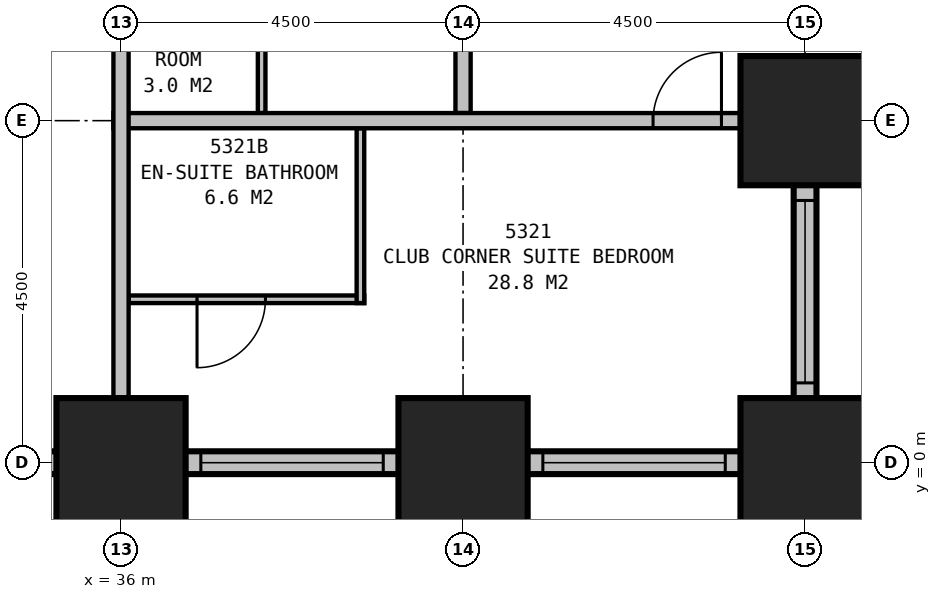
"""IFC4 building model, lengths in metres.
Left out: names, types, materials, properties, quantities, classifications, styles, units other than length and angle.
Written with IfcOpenShell. Run it as: python <this file> out.ifc"""

import sys

from ifc_helpers import new_model, si_unit, direction, frame, frame_2d, origin, origin_2d, place, context, subcontext, project, spatial, rectangle, extrude, element, fill, save


model = new_model("IFC4")
c1 = context("Model", 3, precision=1e-05, world=origin(), true_north=direction((0.0, 1.0)))
c2 = subcontext(c1, "Body", "Model", "MODEL_VIEW")
j1 = project(units=[si_unit("LENGTHUNIT", "METRE"), si_unit("PLANEANGLEUNIT", "RADIAN")], contexts=[c1])
p1 = place(None, origin())
s1 = spatial("IfcSite", under=j1, at=p1, CompositionType="ELEMENT")
p2 = place(p1, origin())
s2 = spatial("IfcBuilding", under=s1, at=p2, CompositionType="ELEMENT")
p3 = place(p2, frame((0.0, 0.0, 204.4)))
s3 = spatial("IfcBuildingStorey", under=s2, at=p3, CompositionType="ELEMENT", Elevation=204.4)
for number, where, z_axis, x_axis in (
    (1, (36.0, 0.0, 0.0), (0.0, 0.0, 1.0), (1.0, 0.0, 0.0)),
    (2, (40.5, 0.0, 0.0), (0.0, 0.0, 1.0), (1.0, 0.0, 0.0)),
    (3, (45.0, 0.0, 0.0), (0.0, 0.0, 1.0), (1.0, 0.0, 0.0)),
    (4, (45.0, 4.5, 0.0), (0.0, 0.0, 1.0), (1.0, 0.0, 0.0)),
):
    element("IfcColumn", number, at=place(p3, frame(where, z_axis=z_axis, x_axis=x_axis)), inside=s3, PredefinedType="COLUMN", context=c2, shape_type="SweptSolid", body=[
        extrude(rectangle(XDim=1.7, YDim=1.7, at=origin_2d()), origin(), (0.0, 0.0, 1.0), 3.5),
    ])
p4 = place(p3, frame((8.85, 0.0, 0.0), z_axis=(0.0, 0.0, 1.0), x_axis=(1.0, 0.0, 0.0)))
e5 = element("IfcWall", 5, at=p4, inside=s3, PredefinedType="STANDARD", context=c2, shape_type="SweptSolid", body=[
    extrude(rectangle(XDim=36.3, YDim=0.3, at=frame_2d((18.15, 0.0))), origin(), (0.0, 0.0, 1.0), 2.25),
])
p5 = place(p4, frame((1.2, 0.0, 0.5)))
e6 = element("IfcOpeningElement", 6, at=p5, cuts=e5, PredefinedType="OPENING", context=c2, shape_type="SweptSolid", body=[
    extrude(rectangle(XDim=2.4, YDim=1.6, at=frame_2d((1.2, 0.8))), frame((0.0, 0.16, 0.0), z_axis=(0.0, -1.0, 0.0), x_axis=(1.0, 0.0, 0.0)), (0.0, 0.0, 1.0), 0.32),
])
p6 = place(p4, frame((5.7, 0.0, 0.5)))
e7 = element("IfcOpeningElement", 7, at=p6, cuts=e5, PredefinedType="OPENING", context=c2, shape_type="SweptSolid", body=[
    extrude(rectangle(XDim=2.4, YDim=1.6, at=frame_2d((1.2, 0.8))), frame((0.0, 0.16, 0.0), z_axis=(0.0, -1.0, 0.0), x_axis=(1.0, 0.0, 0.0)), (0.0, 0.0, 1.0), 0.32),
])
p7 = place(p4, frame((10.2, 0.0, 0.5)))
e8 = element("IfcOpeningElement", 8, at=p7, cuts=e5, PredefinedType="OPENING", context=c2, shape_type="SweptSolid", body=[
    extrude(rectangle(XDim=2.4, YDim=1.6, at=frame_2d((1.2, 0.8))), frame((0.0, 0.16, 0.0), z_axis=(0.0, -1.0, 0.0), x_axis=(1.0, 0.0, 0.0)), (0.0, 0.0, 1.0), 0.32),
])
p8 = place(p4, frame((14.7, 0.0, 0.5)))
e9 = element("IfcOpeningElement", 9, at=p8, cuts=e5, PredefinedType="OPENING", context=c2, shape_type="SweptSolid", body=[
    extrude(rectangle(XDim=2.4, YDim=1.6, at=frame_2d((1.2, 0.8))), frame((0.0, 0.16, 0.0), z_axis=(0.0, -1.0, 0.0), x_axis=(1.0, 0.0, 0.0)), (0.0, 0.0, 1.0), 0.32),
])
p9 = place(p4, frame((19.2, 0.0, 0.5)))
e10 = element("IfcOpeningElement", 10, at=p9, cuts=e5, PredefinedType="OPENING", context=c2, shape_type="SweptSolid", body=[
    extrude(rectangle(XDim=2.4, YDim=1.6, at=frame_2d((1.2, 0.8))), frame((0.0, 0.16, 0.0), z_axis=(0.0, -1.0, 0.0), x_axis=(1.0, 0.0, 0.0)), (0.0, 0.0, 1.0), 0.32),
])
p10 = place(p4, frame((23.7, 0.0, 0.5)))
e11 = element("IfcOpeningElement", 11, at=p10, cuts=e5, PredefinedType="OPENING", context=c2, shape_type="SweptSolid", body=[
    extrude(rectangle(XDim=2.4, YDim=1.6, at=frame_2d((1.2, 0.8))), frame((0.0, 0.16, 0.0), z_axis=(0.0, -1.0, 0.0), x_axis=(1.0, 0.0, 0.0)), (0.0, 0.0, 1.0), 0.32),
])
p11 = place(p4, frame((28.2, 0.0, 0.5)))
e12 = element("IfcOpeningElement", 12, at=p11, cuts=e5, PredefinedType="OPENING", context=c2, shape_type="SweptSolid", body=[
    extrude(rectangle(XDim=2.4, YDim=1.6, at=frame_2d((1.2, 0.8))), frame((0.0, 0.16, 0.0), z_axis=(0.0, -1.0, 0.0), x_axis=(1.0, 0.0, 0.0)), (0.0, 0.0, 1.0), 0.32),
])
p12 = place(p4, frame((32.7, 0.0, 0.5)))
e13 = element("IfcOpeningElement", 13, at=p12, cuts=e5, PredefinedType="OPENING", context=c2, shape_type="SweptSolid", body=[
    extrude(rectangle(XDim=2.4, YDim=1.6, at=frame_2d((1.2, 0.8))), frame((0.0, 0.16, 0.0), z_axis=(0.0, -1.0, 0.0), x_axis=(1.0, 0.0, 0.0)), (0.0, 0.0, 1.0), 0.32),
])
p13 = place(p3, frame((45.0, -0.15, 0.0), z_axis=(0.0, 0.0, 1.0), x_axis=(0.0, 1.0, 0.0)))
e14 = element("IfcWall", 14, at=p13, inside=s3, PredefinedType="STANDARD", context=c2, shape_type="SweptSolid", body=[
    extrude(rectangle(XDim=4.8, YDim=0.3, at=frame_2d((2.4, 0.0))), origin(), (0.0, 0.0, 1.0), 2.25),
])
p14 = place(p13, frame((1.2, 0.0, 0.5)))
e15 = element("IfcOpeningElement", 15, at=p14, cuts=e14, PredefinedType="OPENING", context=c2, shape_type="SweptSolid", body=[
    extrude(rectangle(XDim=2.4, YDim=1.6, at=frame_2d((1.2, 0.8))), frame((0.0, 0.16, 0.0), z_axis=(0.0, -1.0, 0.0), x_axis=(1.0, 0.0, 0.0)), (0.0, 0.0, 1.0), 0.32),
])
p15 = place(p3, frame((44.85, 4.5, 0.0), z_axis=(0.0, 0.0, 1.0), x_axis=(1.0, 0.0, 0.0)))
e16 = element("IfcWall", 16, at=p15, inside=s3, PredefinedType="STANDARD", context=c2, shape_type="SweptSolid", body=[
    extrude(rectangle(XDim=4.3, YDim=0.3, at=frame_2d((2.15, 0.0))), origin(), (0.0, 0.0, 1.0), 2.25),
])
p16 = place(p15, frame((1.4, 0.0, 0.5)))
e17 = element("IfcOpeningElement", 17, at=p16, cuts=e16, PredefinedType="OPENING", context=c2, shape_type="SweptSolid", body=[
    extrude(rectangle(XDim=1.5, YDim=1.6, at=frame_2d((0.75, 0.8))), frame((0.0, 0.16, 0.0), z_axis=(0.0, -1.0, 0.0), x_axis=(1.0, 0.0, 0.0)), (0.0, 0.0, 1.0), 0.32),
])
p17 = place(p3, frame((49.017, 4.351, 0.0), z_axis=(0.0, 0.0, 1.0), x_axis=(-0.110433201132, 0.993883548555, 0.0)))
e18 = element("IfcWall", 18, at=p17, inside=s3, PredefinedType="STANDARD", context=c2, shape_type="SweptSolid", body=[
    extrude(rectangle(XDim=31.994, YDim=0.3, at=frame_2d((15.997, 0.0))), origin(), (0.0, 0.0, 1.0), 2.25),
])
p18 = place(p17, frame((1.664, 0.0, 0.5)))
e19 = element("IfcOpeningElement", 19, at=p18, cuts=e18, PredefinedType="OPENING", context=c2, shape_type="SweptSolid", body=[
    extrude(rectangle(XDim=1.5, YDim=1.6, at=frame_2d((0.75, 0.8))), frame((0.0, 0.16, 0.0), z_axis=(0.0, -1.0, 0.0), x_axis=(1.0, 0.0, 0.0)), (0.0, 0.0, 1.0), 0.32),
])
p19 = place(p17, frame((6.192, 0.0, 0.5)))
e20 = element("IfcOpeningElement", 20, at=p19, cuts=e18, PredefinedType="OPENING", context=c2, shape_type="SweptSolid", body=[
    extrude(rectangle(XDim=1.5, YDim=1.6, at=frame_2d((0.75, 0.8))), frame((0.0, 0.16, 0.0), z_axis=(0.0, -1.0, 0.0), x_axis=(1.0, 0.0, 0.0)), (0.0, 0.0, 1.0), 0.32),
])
p20 = place(p17, frame((10.719, 0.0, 0.5)))
e21 = element("IfcOpeningElement", 21, at=p20, cuts=e18, PredefinedType="OPENING", context=c2, shape_type="SweptSolid", body=[
    extrude(rectangle(XDim=1.5, YDim=1.6, at=frame_2d((0.75, 0.8))), frame((0.0, 0.16, 0.0), z_axis=(0.0, -1.0, 0.0), x_axis=(1.0, 0.0, 0.0)), (0.0, 0.0, 1.0), 0.32),
])
p21 = place(p17, frame((15.247, 0.0, 0.5)))
e22 = element("IfcOpeningElement", 22, at=p21, cuts=e18, PredefinedType="OPENING", context=c2, shape_type="SweptSolid", body=[
    extrude(rectangle(XDim=1.5, YDim=1.6, at=frame_2d((0.75, 0.8))), frame((0.0, 0.16, 0.0), z_axis=(0.0, -1.0, 0.0), x_axis=(1.0, 0.0, 0.0)), (0.0, 0.0, 1.0), 0.32),
])
p22 = place(p17, frame((19.775, 0.0, 0.5)))
e23 = element("IfcOpeningElement", 23, at=p22, cuts=e18, PredefinedType="OPENING", context=c2, shape_type="SweptSolid", body=[
    extrude(rectangle(XDim=1.5, YDim=1.6, at=frame_2d((0.75, 0.8))), frame((0.0, 0.16, 0.0), z_axis=(0.0, -1.0, 0.0), x_axis=(1.0, 0.0, 0.0)), (0.0, 0.0, 1.0), 0.32),
])
p23 = place(p17, frame((24.302, 0.0, 0.5)))
e24 = element("IfcOpeningElement", 24, at=p23, cuts=e18, PredefinedType="OPENING", context=c2, shape_type="SweptSolid", body=[
    extrude(rectangle(XDim=1.5, YDim=1.6, at=frame_2d((0.75, 0.8))), frame((0.0, 0.16, 0.0), z_axis=(0.0, -1.0, 0.0), x_axis=(1.0, 0.0, 0.0)), (0.0, 0.0, 1.0), 0.32),
])
p24 = place(p17, frame((28.83, 0.0, 0.5)))
e25 = element("IfcOpeningElement", 25, at=p24, cuts=e18, PredefinedType="OPENING", context=c2, shape_type="SweptSolid", body=[
    extrude(rectangle(XDim=1.5, YDim=1.6, at=frame_2d((0.75, 0.8))), frame((0.0, 0.16, 0.0), z_axis=(0.0, -1.0, 0.0), x_axis=(1.0, 0.0, 0.0)), (0.0, 0.0, 1.0), 0.32),
])
p25 = place(p3, frame((36.0, 10.6, 0.0), z_axis=(0.0, 0.0, 1.0), x_axis=(0.0, -1.0, 0.0)))
e26 = element("IfcWall", 26, at=p25, inside=s3, PredefinedType="PARTITIONING", context=c2, shape_type="SweptSolid", body=[
    extrude(rectangle(XDim=10.6, YDim=0.2, at=frame_2d((5.3, 0.0))), origin(), (0.0, 0.0, 1.0), 2.25),
])
p26 = place(p3, frame((35.9, 4.5, 0.0), z_axis=(0.0, 0.0, 1.0), x_axis=(1.0, 0.0, 0.0)))
e27 = element("IfcWall", 27, at=p26, inside=s3, PredefinedType="PARTITIONING", context=c2, shape_type="SweptSolid", body=[
    extrude(rectangle(XDim=9.1, YDim=0.2, at=frame_2d((4.55, 0.0))), origin(), (0.0, 0.0, 1.0), 3.25),
])
p27 = place(p26, frame((7.1, 0.0, 0.0)))
e28 = element("IfcOpeningElement", 28, at=p27, cuts=e27, PredefinedType="OPENING", context=c2, shape_type="SweptSolid", body=[
    extrude(rectangle(XDim=0.9, YDim=2.1, at=frame_2d((0.45, 1.05))), frame((0.0, 0.11, 0.0), z_axis=(0.0, -1.0, 0.0), x_axis=(1.0, 0.0, 0.0)), (0.0, 0.0, 1.0), 0.22),
])
p28 = place(p3, frame((40.5, 4.6, 0.0), z_axis=(0.0, 0.0, 1.0), x_axis=(0.0, 1.0, 0.0)))
e29 = element("IfcWall", 29, at=p28, inside=s3, PredefinedType="PARTITIONING", context=c2, shape_type="SweptSolid", body=[
    extrude(rectangle(XDim=8.8, YDim=0.2, at=frame_2d((4.4, 0.0))), origin(), (0.0, 0.0, 1.0), 2.25),
])
p29 = place(p28, frame((4.05, 0.0, 0.0)))
e30 = element("IfcOpeningElement", 30, at=p29, cuts=e29, PredefinedType="OPENING", context=c2, shape_type="SweptSolid", body=[
    extrude(rectangle(XDim=0.9, YDim=2.1, at=frame_2d((0.45, 1.05))), frame((0.0, 0.11, 0.0), z_axis=(0.0, -1.0, 0.0), x_axis=(1.0, 0.0, 0.0)), (0.0, 0.0, 1.0), 0.22),
])
p30 = place(p3, frame((37.85, 4.6, 0.0), z_axis=(0.0, 0.0, 1.0), x_axis=(0.0, 1.0, 0.0)))
e31 = element("IfcWall", 31, at=p30, inside=s3, PredefinedType="PLUMBINGWALL", context=c2, shape_type="SweptSolid", body=[
    extrude(rectangle(XDim=2.0, YDim=0.1, at=frame_2d((1.0, 0.0))), origin(), (0.0, 0.0, 1.0), 3.25),
])
p31 = place(p3, frame((39.15, 4.4, 0.0), z_axis=(0.0, 0.0, 1.0), x_axis=(0.0, -1.0, 0.0)))
e32 = element("IfcWall", 32, at=p31, inside=s3, PredefinedType="PLUMBINGWALL", context=c2, shape_type="SweptSolid", body=[
    extrude(rectangle(XDim=2.3, YDim=0.1, at=frame_2d((1.15, 0.0))), origin(), (0.0, 0.0, 1.0), 3.25),
])
p32 = place(p3, frame((36.1, 2.15, 0.0), z_axis=(0.0, 0.0, 1.0), x_axis=(1.0, 0.0, 0.0)))
e33 = element("IfcWall", 33, at=p32, inside=s3, PredefinedType="PLUMBINGWALL", context=c2, shape_type="SweptSolid", body=[
    extrude(rectangle(XDim=3.1, YDim=0.1, at=frame_2d((1.55, 0.0))), origin(), (0.0, 0.0, 1.0), 3.25),
])
p33 = place(p32, frame((1.8, 0.0, 0.0), z_axis=(0.0, 0.0, 1.0), x_axis=(-1.0, 0.0, 0.0)))
e34 = element("IfcOpeningElement", 34, at=p33, cuts=e33, PredefinedType="OPENING", context=c2, shape_type="SweptSolid", body=[
    extrude(rectangle(XDim=0.9, YDim=2.1, at=frame_2d((0.45, 1.05))), frame((0.0, 0.06, 0.0), z_axis=(0.0, -1.0, 0.0), x_axis=(1.0, 0.0, 0.0)), (0.0, 0.0, 1.0), 0.12),
])
p34 = place(p11, origin())
e35 = element("IfcWindow", 35, at=p34, inside=s3, PartitioningType="SINGLE_PANEL", PredefinedType="WINDOW", context=c2, shape_type="SweptSolid", body=[
    extrude(rectangle(XDim=2.4, YDim=1.6, at=frame_2d((1.2, 0.8))), frame((0.0, 0.03, 0.0), z_axis=(0.0, -1.0, 0.0), x_axis=(1.0, 0.0, 0.0)), (0.0, 0.0, 1.0), 0.06),
])
fill(e12, e35)
p35 = place(p12, origin())
e36 = element("IfcWindow", 36, at=p35, inside=s3, PartitioningType="SINGLE_PANEL", PredefinedType="WINDOW", context=c2, shape_type="SweptSolid", body=[
    extrude(rectangle(XDim=2.4, YDim=1.6, at=frame_2d((1.2, 0.8))), frame((0.0, 0.03, 0.0), z_axis=(0.0, -1.0, 0.0), x_axis=(1.0, 0.0, 0.0)), (0.0, 0.0, 1.0), 0.06),
])
fill(e13, e36)
p36 = place(p14, origin())
e37 = element("IfcWindow", 37, at=p36, inside=s3, PartitioningType="SINGLE_PANEL", PredefinedType="WINDOW", context=c2, shape_type="SweptSolid", body=[
    extrude(rectangle(XDim=2.4, YDim=1.6, at=frame_2d((1.2, 0.8))), frame((0.0, 0.03, 0.0), z_axis=(0.0, -1.0, 0.0), x_axis=(1.0, 0.0, 0.0)), (0.0, 0.0, 1.0), 0.06),
])
fill(e15, e37)
p37 = place(p27, origin())
e38 = element("IfcDoor", 38, at=p37, inside=s3, OperationType="SINGLE_SWING_RIGHT", PredefinedType="DOOR", context=c2, shape_type="SweptSolid", body=[
    extrude(rectangle(XDim=0.9, YDim=2.1, at=frame_2d((0.45, 1.05))), frame((0.0, 0.025, 0.0), z_axis=(0.0, -1.0, 0.0), x_axis=(1.0, 0.0, 0.0)), (0.0, 0.0, 1.0), 0.05),
])
fill(e28, e38)
p38 = place(p33, origin())
e39 = element("IfcDoor", 39, at=p38, inside=s3, OperationType="SINGLE_SWING_RIGHT", PredefinedType="DOOR", context=c2, shape_type="SweptSolid", body=[
    extrude(rectangle(XDim=0.9, YDim=2.1, at=frame_2d((0.45, 1.05))), frame((0.0, 0.025, 0.0), z_axis=(0.0, -1.0, 0.0), x_axis=(1.0, 0.0, 0.0)), (0.0, 0.0, 1.0), 0.05),
])
fill(e34, e39)
save(model, sys.argv[1])
